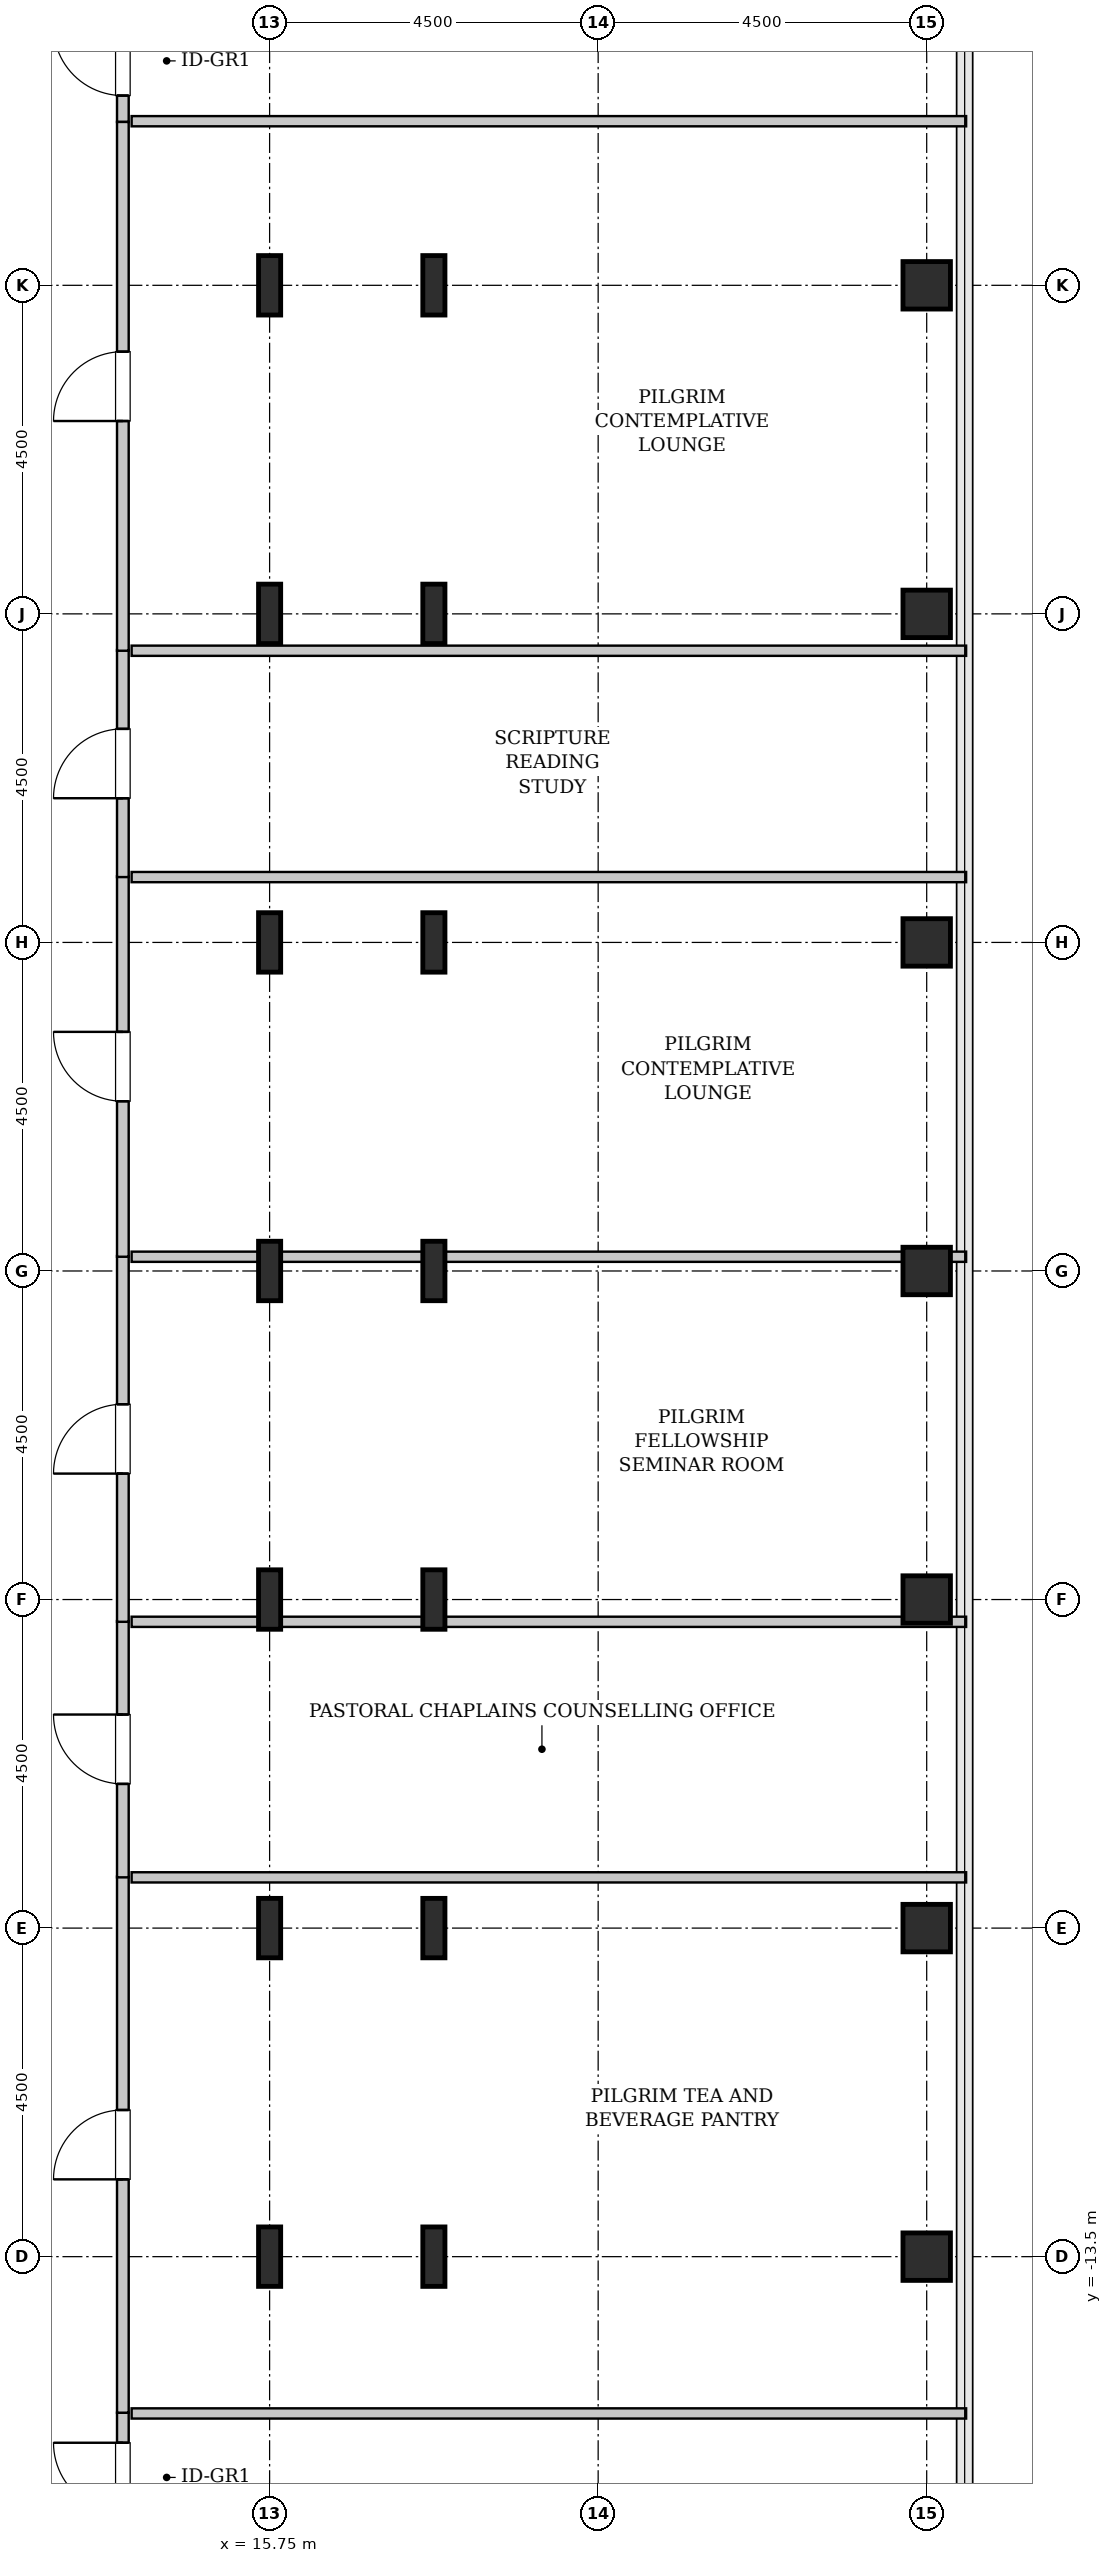
"""IFC4 building model, lengths in metres.
Left out: names, types, materials, properties, quantities, classifications, styles, units other than length and angle.
Written with IfcOpenShell. Run it as: python <this file> out.ifc"""

import sys

from ifc_helpers import new_model, si_unit, direction, frame, frame_2d, origin, origin_2d, place, context, subcontext, project, spatial, rectangle, hollow_rectangle, i_section, extrude, source, transform, mapped, element, fill, save


model = new_model("IFC4")
c1 = context("Model", 3, precision=1e-05, world=origin(), true_north=direction((0.0, 1.0)))
c2 = subcontext(c1, "Body", "Model", "MODEL_VIEW")
j1 = project(units=[si_unit("LENGTHUNIT", "METRE"), si_unit("PLANEANGLEUNIT", "RADIAN")], contexts=[c1])
p1 = place(None, origin())
s1 = spatial("IfcSite", under=j1, at=p1, CompositionType="ELEMENT")
p2 = place(p1, origin())
s2 = spatial("IfcBuilding", under=s1, at=p2, CompositionType="ELEMENT")
p3 = place(p2, frame((0.0, 0.0, 248.4)))
s3 = spatial("IfcBuildingStorey", under=s2, at=p3, CompositionType="ELEMENT", Elevation=248.4)
m1 = source(origin(), c2, "Body", "SweptSolid", [
    extrude(i_section(OverallWidth=0.303, OverallDepth=0.814, WebThickness=0.021, FlangeThickness=0.04, FilletRadius=0.03, at=origin_2d()), origin(), (0.0, 0.0, 1.0), 3.8),
])
for number, where, z_axis, x_axis in (
    (1, (15.75, -13.5, 0.0), (0.0, 0.0, 1.0), (1.0, 0.0, 0.0)),
    (2, (15.75, -9.0, 0.0), (0.0, 0.0, 1.0), (1.0, 0.0, 0.0)),
    (3, (15.75, -4.5, 0.0), (0.0, 0.0, 1.0), (1.0, 0.0, 0.0)),
    (4, (15.75, 0.0, 0.0), (0.0, 0.0, 1.0), (1.0, 0.0, 0.0)),
    (5, (15.75, 4.5, 0.0), (0.0, 0.0, 1.0), (1.0, 0.0, 0.0)),
    (6, (15.75, 9.0, 0.0), (0.0, 0.0, 1.0), (1.0, 0.0, 0.0)),
    (7, (15.75, 13.5, 0.0), (0.0, 0.0, 1.0), (1.0, 0.0, 0.0)),
    (8, (18.0, -13.5, 0.0), (0.0, 0.0, 1.0), (1.0, 0.0, 0.0)),
    (9, (18.0, -9.0, 0.0), (0.0, 0.0, 1.0), (1.0, 0.0, 0.0)),
    (10, (18.0, -4.5, 0.0), (0.0, 0.0, 1.0), (1.0, 0.0, 0.0)),
    (11, (18.0, 0.0, 0.0), (0.0, 0.0, 1.0), (1.0, 0.0, 0.0)),
    (12, (18.0, 4.5, 0.0), (0.0, 0.0, 1.0), (1.0, 0.0, 0.0)),
    (13, (18.0, 9.0, 0.0), (0.0, 0.0, 1.0), (1.0, 0.0, 0.0)),
    (14, (18.0, 13.5, 0.0), (0.0, 0.0, 1.0), (1.0, 0.0, 0.0)),
):
    element("IfcColumn", number, at=place(p3, frame(where, z_axis=z_axis, x_axis=x_axis)), inside=s3, PredefinedType="COLUMN", context=c2, shape_type="MappedRepresentation", body=[
        mapped(m1, transform((0.0, 0.0, 0.0), x_axis=(1.0, 0.0, 0.0), y_axis=(0.0, 1.0, 0.0), z_axis=(0.0, 0.0, 1.0), scale=1.0)),
    ])
m2 = source(origin(), c2, "Body", "SweptSolid", [
    extrude(hollow_rectangle(XDim=0.65, YDim=0.65, WallThickness=0.032, InnerFilletRadius=0.032, OuterFilletRadius=0.064, at=origin_2d()), origin(), (0.0, 0.0, 1.0), 3.8),
])
for number, where, z_axis, x_axis in (
    (15, (24.75, -13.5, 0.0), (0.0, 0.0, 1.0), (1.0, 0.0, 0.0)),
    (16, (24.75, -9.0, 0.0), (0.0, 0.0, 1.0), (1.0, 0.0, 0.0)),
    (17, (24.75, -4.5, 0.0), (0.0, 0.0, 1.0), (1.0, 0.0, 0.0)),
    (18, (24.75, 0.0, 0.0), (0.0, 0.0, 1.0), (1.0, 0.0, 0.0)),
    (19, (24.75, 4.5, 0.0), (0.0, 0.0, 1.0), (1.0, 0.0, 0.0)),
    (20, (24.75, 9.0, 0.0), (0.0, 0.0, 1.0), (1.0, 0.0, 0.0)),
    (21, (24.75, 13.5, 0.0), (0.0, 0.0, 1.0), (1.0, 0.0, 0.0)),
):
    element("IfcColumn", number, at=place(p3, frame(where, z_axis=z_axis, x_axis=x_axis)), inside=s3, PredefinedType="COLUMN", context=c2, shape_type="MappedRepresentation", body=[
        mapped(m2, transform((0.0, 0.0, 0.0), x_axis=(1.0, 0.0, 0.0), y_axis=(0.0, 1.0, 0.0), z_axis=(0.0, 0.0, 1.0), scale=1.0)),
    ])
m3 = source(origin(), c2, "Body", "SweptSolid", [
    extrude(rectangle(XDim=7.403, YDim=0.16, at=frame_2d((3.701, 0.0))), origin(), (0.0, 0.0, 1.0), 3.535),
])
p4 = place(p3, frame((13.74, -23.04, 0.0), z_axis=(0.0, 0.0, 1.0), x_axis=(0.0, 1.0, 0.0)))
e22 = element("IfcWall", 22, at=p4, inside=s3, PredefinedType="PARTITIONING", context=c2, shape_type="MappedRepresentation", body=[
    mapped(m3, transform((0.0, 0.0, 0.0), x_axis=(1.0, 0.0, 0.0), y_axis=(0.0, 1.0, 0.0), z_axis=(0.0, 0.0, 1.0), scale=1.0)),
])
p5 = place(p4, frame((6.041, 0.0, 0.0)))
e23 = element("IfcOpeningElement", 23, at=p5, cuts=e22, PredefinedType="OPENING", context=c2, shape_type="SweptSolid", body=[
    extrude(rectangle(XDim=0.95, YDim=2.1, at=frame_2d((0.475, 1.05))), frame((0.0, 0.09, 0.0), z_axis=(0.0, -1.0, 0.0), x_axis=(1.0, 0.0, 0.0)), (0.0, 0.0, 1.0), 0.18),
])
m4 = source(origin(), c2, "Body", "SweptSolid", [
    extrude(rectangle(XDim=11.43, YDim=0.14, at=frame_2d((5.715, 0.0))), origin(), (0.0, 0.0, 1.0), 3.535),
])
p6 = place(p3, frame((13.86, -15.647, 0.0), z_axis=(0.0, 0.0, 1.0), x_axis=(1.0, 0.0, 0.0)))
e24 = element("IfcWall", 24, at=p6, inside=s3, PredefinedType="PARTITIONING", context=c2, shape_type="MappedRepresentation", body=[
    mapped(m4, transform((0.0, 0.0, 0.0), x_axis=(1.0, 0.0, 0.0), y_axis=(0.0, 1.0, 0.0), z_axis=(0.0, 0.0, 1.0), scale=1.0)),
])
m5 = source(origin(), c2, "Body", "SweptSolid", [
    extrude(rectangle(XDim=7.343, YDim=0.16, at=frame_2d((3.671, 0.0))), origin(), (0.0, 0.0, 1.0), 3.535),
])
p7 = place(p3, frame((13.74, -15.637, 0.0), z_axis=(0.0, 0.0, 1.0), x_axis=(0.0, 1.0, 0.0)))
e25 = element("IfcWall", 25, at=p7, inside=s3, PredefinedType="PARTITIONING", context=c2, shape_type="MappedRepresentation", body=[
    mapped(m5, transform((0.0, 0.0, 0.0), x_axis=(1.0, 0.0, 0.0), y_axis=(0.0, 1.0, 0.0), z_axis=(0.0, 0.0, 1.0), scale=1.0)),
])
p8 = place(p7, frame((3.196, 0.0, 0.0)))
e26 = element("IfcOpeningElement", 26, at=p8, cuts=e25, PredefinedType="OPENING", context=c2, shape_type="SweptSolid", body=[
    extrude(rectangle(XDim=0.95, YDim=2.1, at=frame_2d((0.475, 1.05))), frame((0.0, 0.09, 0.0), z_axis=(0.0, -1.0, 0.0), x_axis=(1.0, 0.0, 0.0)), (0.0, 0.0, 1.0), 0.18),
])
p9 = place(p3, frame((13.86, -8.305, 0.0), z_axis=(0.0, 0.0, 1.0), x_axis=(1.0, 0.0, 0.0)))
e27 = element("IfcWall", 27, at=p9, inside=s3, PredefinedType="PARTITIONING", context=c2, shape_type="MappedRepresentation", body=[
    mapped(m4, transform((0.0, 0.0, 0.0), x_axis=(1.0, 0.0, 0.0), y_axis=(0.0, 1.0, 0.0), z_axis=(0.0, 0.0, 1.0), scale=1.0)),
])
m6 = source(origin(), c2, "Body", "SweptSolid", [
    extrude(rectangle(XDim=3.51, YDim=0.16, at=frame_2d((1.755, 0.0))), origin(), (0.0, 0.0, 1.0), 3.535),
])
p10 = place(p3, frame((13.74, -8.305, 0.0), z_axis=(0.0, 0.0, 1.0), x_axis=(0.0, 1.0, 0.0)))
e28 = element("IfcWall", 28, at=p10, inside=s3, PredefinedType="PARTITIONING", context=c2, shape_type="MappedRepresentation", body=[
    mapped(m6, transform((0.0, 0.0, 0.0), x_axis=(1.0, 0.0, 0.0), y_axis=(0.0, 1.0, 0.0), z_axis=(0.0, 0.0, 1.0), scale=1.0)),
])
p11 = place(p10, frame((1.28, 0.0, 0.0)))
e29 = element("IfcOpeningElement", 29, at=p11, cuts=e28, PredefinedType="OPENING", context=c2, shape_type="SweptSolid", body=[
    extrude(rectangle(XDim=0.95, YDim=2.1, at=frame_2d((0.475, 1.05))), frame((0.0, 0.09, 0.0), z_axis=(0.0, -1.0, 0.0), x_axis=(1.0, 0.0, 0.0)), (0.0, 0.0, 1.0), 0.18),
])
m7 = source(origin(), c2, "Body", "SweptSolid", [
    extrude(rectangle(XDim=11.43, YDim=0.14, at=frame_2d((5.715, 0.0))), origin(), (0.0, 0.0, 1.0), 2.925),
])
p12 = place(p3, frame((13.86, -4.805, 0.0), z_axis=(0.0, 0.0, 1.0), x_axis=(1.0, 0.0, 0.0)))
e30 = element("IfcWall", 30, at=p12, inside=s3, PredefinedType="PARTITIONING", context=c2, shape_type="MappedRepresentation", body=[
    mapped(m7, transform((0.0, 0.0, 0.0), x_axis=(1.0, 0.0, 0.0), y_axis=(0.0, 1.0, 0.0), z_axis=(0.0, 0.0, 1.0), scale=1.0)),
])
m8 = source(origin(), c2, "Body", "SweptSolid", [
    extrude(rectangle(XDim=5.01, YDim=0.16, at=frame_2d((2.505, 0.0))), origin(), (0.0, 0.0, 1.0), 3.535),
])
p13 = place(p3, frame((13.74, -4.805, 0.0), z_axis=(0.0, 0.0, 1.0), x_axis=(0.0, 1.0, 0.0)))
e31 = element("IfcWall", 31, at=p13, inside=s3, PredefinedType="PARTITIONING", context=c2, shape_type="MappedRepresentation", body=[
    mapped(m8, transform((0.0, 0.0, 0.0), x_axis=(1.0, 0.0, 0.0), y_axis=(0.0, 1.0, 0.0), z_axis=(0.0, 0.0, 1.0), scale=1.0)),
])
p14 = place(p13, frame((2.03, 0.0, 0.0)))
e32 = element("IfcOpeningElement", 32, at=p14, cuts=e31, PredefinedType="OPENING", context=c2, shape_type="SweptSolid", body=[
    extrude(rectangle(XDim=0.95, YDim=2.1, at=frame_2d((0.475, 1.05))), frame((0.0, 0.09, 0.0), z_axis=(0.0, -1.0, 0.0), x_axis=(1.0, 0.0, 0.0)), (0.0, 0.0, 1.0), 0.18),
])
p15 = place(p3, frame((13.86, 0.195, 0.0), z_axis=(0.0, 0.0, 1.0), x_axis=(1.0, 0.0, 0.0)))
e33 = element("IfcWall", 33, at=p15, inside=s3, PredefinedType="PARTITIONING", context=c2, shape_type="MappedRepresentation", body=[
    mapped(m7, transform((0.0, 0.0, 0.0), x_axis=(1.0, 0.0, 0.0), y_axis=(0.0, 1.0, 0.0), z_axis=(0.0, 0.0, 1.0), scale=1.0)),
])
m9 = source(origin(), c2, "Body", "SweptSolid", [
    extrude(rectangle(XDim=5.21, YDim=0.16, at=frame_2d((2.605, 0.0))), origin(), (0.0, 0.0, 1.0), 3.535),
])
p16 = place(p3, frame((13.74, 0.195, 0.0), z_axis=(0.0, 0.0, 1.0), x_axis=(0.0, 1.0, 0.0)))
e34 = element("IfcWall", 34, at=p16, inside=s3, PredefinedType="PARTITIONING", context=c2, shape_type="MappedRepresentation", body=[
    mapped(m9, transform((0.0, 0.0, 0.0), x_axis=(1.0, 0.0, 0.0), y_axis=(0.0, 1.0, 0.0), z_axis=(0.0, 0.0, 1.0), scale=1.0)),
])
p17 = place(p16, frame((2.13, 0.0, 0.0)))
e35 = element("IfcOpeningElement", 35, at=p17, cuts=e34, PredefinedType="OPENING", context=c2, shape_type="SweptSolid", body=[
    extrude(rectangle(XDim=0.95, YDim=2.1, at=frame_2d((0.475, 1.05))), frame((0.0, 0.09, 0.0), z_axis=(0.0, -1.0, 0.0), x_axis=(1.0, 0.0, 0.0)), (0.0, 0.0, 1.0), 0.18),
])
p18 = place(p3, frame((13.86, 5.395, 0.0), z_axis=(0.0, 0.0, 1.0), x_axis=(1.0, 0.0, 0.0)))
e36 = element("IfcWall", 36, at=p18, inside=s3, PredefinedType="PARTITIONING", context=c2, shape_type="MappedRepresentation", body=[
    mapped(m4, transform((0.0, 0.0, 0.0), x_axis=(1.0, 0.0, 0.0), y_axis=(0.0, 1.0, 0.0), z_axis=(0.0, 0.0, 1.0), scale=1.0)),
])
m10 = source(origin(), c2, "Body", "SweptSolid", [
    extrude(rectangle(XDim=3.11, YDim=0.16, at=frame_2d((1.555, 0.0))), origin(), (0.0, 0.0, 1.0), 3.535),
])
p19 = place(p3, frame((13.74, 5.395, 0.0), z_axis=(0.0, 0.0, 1.0), x_axis=(0.0, 1.0, 0.0)))
e37 = element("IfcWall", 37, at=p19, inside=s3, PredefinedType="PARTITIONING", context=c2, shape_type="MappedRepresentation", body=[
    mapped(m10, transform((0.0, 0.0, 0.0), x_axis=(1.0, 0.0, 0.0), y_axis=(0.0, 1.0, 0.0), z_axis=(0.0, 0.0, 1.0), scale=1.0)),
])
p20 = place(p19, frame((1.08, 0.0, 0.0)))
e38 = element("IfcOpeningElement", 38, at=p20, cuts=e37, PredefinedType="OPENING", context=c2, shape_type="SweptSolid", body=[
    extrude(rectangle(XDim=0.95, YDim=2.1, at=frame_2d((0.475, 1.05))), frame((0.0, 0.09, 0.0), z_axis=(0.0, -1.0, 0.0), x_axis=(1.0, 0.0, 0.0)), (0.0, 0.0, 1.0), 0.18),
])
p21 = place(p3, frame((13.86, 8.495, 0.0), z_axis=(0.0, 0.0, 1.0), x_axis=(1.0, 0.0, 0.0)))
e39 = element("IfcWall", 39, at=p21, inside=s3, PredefinedType="PARTITIONING", context=c2, shape_type="MappedRepresentation", body=[
    mapped(m7, transform((0.0, 0.0, 0.0), x_axis=(1.0, 0.0, 0.0), y_axis=(0.0, 1.0, 0.0), z_axis=(0.0, 0.0, 1.0), scale=1.0)),
])
m11 = source(origin(), c2, "Body", "SweptSolid", [
    extrude(rectangle(XDim=7.302, YDim=0.16, at=frame_2d((3.651, 0.0))), origin(), (0.0, 0.0, 1.0), 3.535),
])
p22 = place(p3, frame((13.74, 15.738, 0.0), z_axis=(0.0, 0.0, 1.0), x_axis=(0.0, 1.0, 0.0)))
e40 = element("IfcWall", 40, at=p22, inside=s3, PredefinedType="PARTITIONING", context=c2, shape_type="MappedRepresentation", body=[
    mapped(m11, transform((0.0, 0.0, 0.0), x_axis=(1.0, 0.0, 0.0), y_axis=(0.0, 1.0, 0.0), z_axis=(0.0, 0.0, 1.0), scale=1.0)),
])
p23 = place(p22, frame((0.361, 0.0, 0.0)))
e41 = element("IfcOpeningElement", 41, at=p23, cuts=e40, PredefinedType="OPENING", context=c2, shape_type="SweptSolid", body=[
    extrude(rectangle(XDim=0.95, YDim=2.1, at=frame_2d((0.475, 1.05))), frame((0.0, 0.09, 0.0), z_axis=(0.0, -1.0, 0.0), x_axis=(1.0, 0.0, 0.0)), (0.0, 0.0, 1.0), 0.18),
])
p24 = place(p3, frame((13.86, 15.748, 0.0), z_axis=(0.0, 0.0, 1.0), x_axis=(1.0, 0.0, 0.0)))
e42 = element("IfcWall", 42, at=p24, inside=s3, PredefinedType="PARTITIONING", context=c2, shape_type="MappedRepresentation", body=[
    mapped(m4, transform((0.0, 0.0, 0.0), x_axis=(1.0, 0.0, 0.0), y_axis=(0.0, 1.0, 0.0), z_axis=(0.0, 0.0, 1.0), scale=1.0)),
])
m12 = source(origin(), c2, "Body", "SweptSolid", [
    extrude(rectangle(XDim=7.242, YDim=0.16, at=frame_2d((3.621, 0.0))), origin(), (0.0, 0.0, 1.0), 3.535),
])
p25 = place(p3, frame((13.74, 8.495, 0.0), z_axis=(0.0, 0.0, 1.0), x_axis=(0.0, 1.0, 0.0)))
e43 = element("IfcWall", 43, at=p25, inside=s3, PredefinedType="PARTITIONING", context=c2, shape_type="MappedRepresentation", body=[
    mapped(m12, transform((0.0, 0.0, 0.0), x_axis=(1.0, 0.0, 0.0), y_axis=(0.0, 1.0, 0.0), z_axis=(0.0, 0.0, 1.0), scale=1.0)),
])
p26 = place(p25, frame((3.146, 0.0, 0.0)))
e44 = element("IfcOpeningElement", 44, at=p26, cuts=e43, PredefinedType="OPENING", context=c2, shape_type="SweptSolid", body=[
    extrude(rectangle(XDim=0.95, YDim=2.1, at=frame_2d((0.475, 1.05))), frame((0.0, 0.09, 0.0), z_axis=(0.0, -1.0, 0.0), x_axis=(1.0, 0.0, 0.0)), (0.0, 0.0, 1.0), 0.18),
])
m13 = source(origin(), c2, "Body", "SweptSolid", [
    extrude(rectangle(XDim=0.95, YDim=2.1, at=frame_2d((0.475, 1.05))), frame((0.0, 0.025, 0.0), z_axis=(0.0, -1.0, 0.0), x_axis=(1.0, 0.0, 0.0)), (0.0, 0.0, 1.0), 0.05),
])
p27 = place(p5, origin())
e45 = element("IfcDoor", 45, at=p27, inside=s3, OperationType="SINGLE_SWING_RIGHT", PredefinedType="DOOR", context=c2, shape_type="MappedRepresentation", body=[
    mapped(m13, transform((0.0, 0.0, 0.0), x_axis=(1.0, 0.0, 0.0), y_axis=(0.0, 1.0, 0.0), z_axis=(0.0, 0.0, 1.0), scale=1.0)),
])
fill(e23, e45)
p28 = place(p8, origin())
e46 = element("IfcDoor", 46, at=p28, inside=s3, OperationType="SINGLE_SWING_LEFT", PredefinedType="DOOR", context=c2, shape_type="MappedRepresentation", body=[
    mapped(m13, transform((0.0, 0.0, 0.0), x_axis=(1.0, 0.0, 0.0), y_axis=(0.0, 1.0, 0.0), z_axis=(0.0, 0.0, 1.0), scale=1.0)),
])
fill(e26, e46)
p29 = place(p11, origin())
e47 = element("IfcDoor", 47, at=p29, inside=s3, OperationType="SINGLE_SWING_RIGHT", PredefinedType="DOOR", context=c2, shape_type="MappedRepresentation", body=[
    mapped(m13, transform((0.0, 0.0, 0.0), x_axis=(1.0, 0.0, 0.0), y_axis=(0.0, 1.0, 0.0), z_axis=(0.0, 0.0, 1.0), scale=1.0)),
])
fill(e29, e47)
p30 = place(p14, origin())
e48 = element("IfcDoor", 48, at=p30, inside=s3, OperationType="SINGLE_SWING_LEFT", PredefinedType="DOOR", context=c2, shape_type="MappedRepresentation", body=[
    mapped(m13, transform((0.0, 0.0, 0.0), x_axis=(1.0, 0.0, 0.0), y_axis=(0.0, 1.0, 0.0), z_axis=(0.0, 0.0, 1.0), scale=1.0)),
])
fill(e32, e48)
p31 = place(p17, origin())
e49 = element("IfcDoor", 49, at=p31, inside=s3, OperationType="SINGLE_SWING_RIGHT", PredefinedType="DOOR", context=c2, shape_type="MappedRepresentation", body=[
    mapped(m13, transform((0.0, 0.0, 0.0), x_axis=(1.0, 0.0, 0.0), y_axis=(0.0, 1.0, 0.0), z_axis=(0.0, 0.0, 1.0), scale=1.0)),
])
fill(e35, e49)
p32 = place(p20, origin())
e50 = element("IfcDoor", 50, at=p32, inside=s3, OperationType="SINGLE_SWING_LEFT", PredefinedType="DOOR", context=c2, shape_type="MappedRepresentation", body=[
    mapped(m13, transform((0.0, 0.0, 0.0), x_axis=(1.0, 0.0, 0.0), y_axis=(0.0, 1.0, 0.0), z_axis=(0.0, 0.0, 1.0), scale=1.0)),
])
fill(e38, e50)
p33 = place(p23, origin())
e51 = element("IfcDoor", 51, at=p33, inside=s3, OperationType="SINGLE_SWING_RIGHT", PredefinedType="DOOR", context=c2, shape_type="MappedRepresentation", body=[
    mapped(m13, transform((0.0, 0.0, 0.0), x_axis=(1.0, 0.0, 0.0), y_axis=(0.0, 1.0, 0.0), z_axis=(0.0, 0.0, 1.0), scale=1.0)),
])
fill(e41, e51)
p34 = place(p26, origin())
e52 = element("IfcDoor", 52, at=p34, inside=s3, OperationType="SINGLE_SWING_LEFT", PredefinedType="DOOR", context=c2, shape_type="MappedRepresentation", body=[
    mapped(m13, transform((0.0, 0.0, 0.0), x_axis=(1.0, 0.0, 0.0), y_axis=(0.0, 1.0, 0.0), z_axis=(0.0, 0.0, 1.0), scale=1.0)),
])
fill(e44, e52)
save(model, sys.argv[1])
